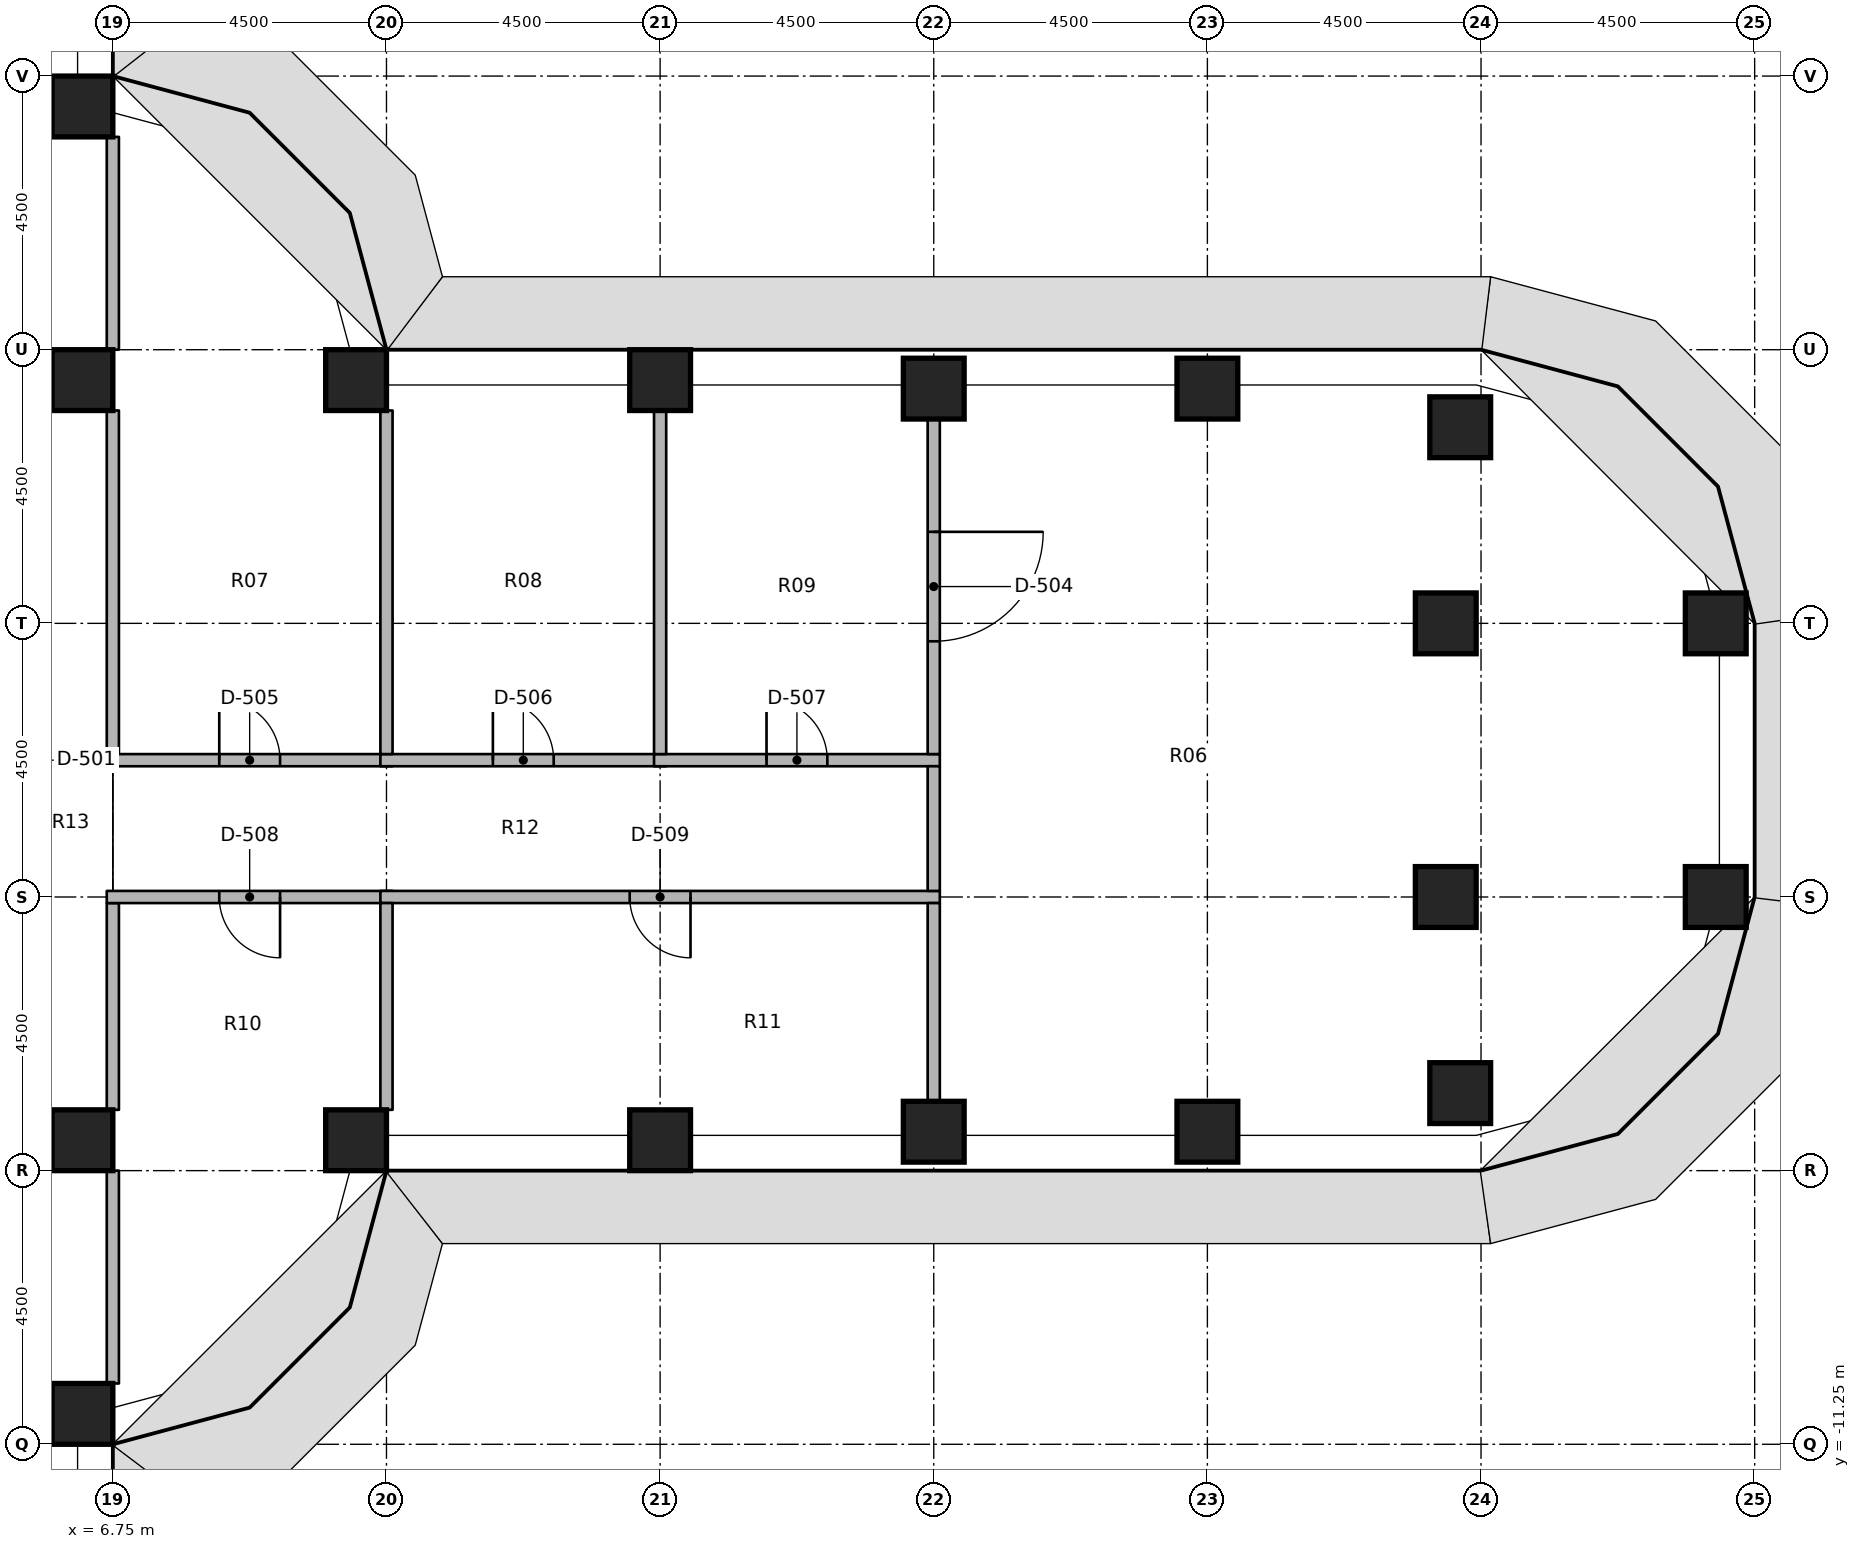
"""IFC4 building model, lengths in metres.
Left out: names, types, materials, properties, quantities, classifications, styles, units other than length and angle.
Written with IfcOpenShell. Run it as: python <this file> out.ifc"""

import sys

from ifc_helpers import new_model, si_unit, direction, frame, frame_2d, origin, origin_2d, place, context, subcontext, project, spatial, rectangle, extrude, element, fill, save


model = new_model("IFC4")
c1 = context("Model", 3, precision=1e-05, world=origin(), true_north=direction((0.0, 1.0)))
c2 = subcontext(c1, "Body", "Model", "MODEL_VIEW")
j1 = project(units=[si_unit("LENGTHUNIT", "METRE"), si_unit("PLANEANGLEUNIT", "RADIAN")], contexts=[c1])
p1 = place(None, origin())
s1 = spatial("IfcSite", under=j1, at=p1, CompositionType="ELEMENT")
p2 = place(p1, origin())
s2 = spatial("IfcBuilding", under=s1, at=p2, CompositionType="ELEMENT")
p3 = place(p2, frame((0.0, 0.0, 69.0)))
s3 = spatial("IfcBuildingStorey", under=s2, at=p3, CompositionType="ELEMENT", Elevation=69.0)
for number, where, z_axis, x_axis in (
    (1, (6.25, -10.75, 0.0), (0.0, 0.0, 1.0), (1.0, 0.0, 0.0)),
    (2, (6.25, -6.25, 0.0), (0.0, 0.0, 1.0), (1.0, 0.0, 0.0)),
    (3, (6.25, 6.25, 0.0), (0.0, 0.0, 1.0), (1.0, 0.0, 0.0)),
    (4, (6.25, 10.75, 0.0), (0.0, 0.0, 1.0), (1.0, 0.0, 0.0)),
    (5, (10.75, -6.25, 0.0), (0.0, 0.0, 1.0), (1.0, 0.0, 0.0)),
    (6, (10.75, 6.25, 0.0), (0.0, 0.0, 1.0), (1.0, 0.0, 0.0)),
    (7, (15.75, -6.25, 0.0), (0.0, 0.0, 1.0), (1.0, 0.0, 0.0)),
    (8, (15.75, 6.25, 0.0), (0.0, 0.0, 1.0), (1.0, 0.0, 0.0)),
    (9, (20.25, -6.11, 0.0), (0.0, 0.0, 1.0), (1.0, 0.0, 0.0)),
    (10, (20.25, 6.11, 0.0), (0.0, 0.0, 1.0), (1.0, 0.0, 0.0)),
    (11, (24.75, -6.11, 0.0), (0.0, 0.0, 1.0), (1.0, 0.0, 0.0)),
    (12, (24.75, 6.11, 0.0), (0.0, 0.0, 1.0), (1.0, 0.0, 0.0)),
    (13, (28.908, -5.475, 0.0), (0.0, 0.0, 1.0), (1.0, 0.0, 0.0)),
    (14, (28.67, -2.25, 0.0), (0.0, 0.0, 1.0), (1.0, 0.0, 0.0)),
    (15, (28.67, 2.25, 0.0), (0.0, 0.0, 1.0), (1.0, 0.0, 0.0)),
    (16, (28.908, 5.475, 0.0), (0.0, 0.0, 1.0), (1.0, 0.0, 0.0)),
    (17, (33.11, -2.25, 0.0), (0.0, 0.0, 1.0), (1.0, 0.0, 0.0)),
    (18, (33.11, 2.25, 0.0), (0.0, 0.0, 1.0), (1.0, 0.0, 0.0)),
):
    element("IfcColumn", number, at=place(p3, frame(where, z_axis=z_axis, x_axis=x_axis)), inside=s3, PredefinedType="COLUMN", context=c2, shape_type="SweptSolid", body=[
        extrude(rectangle(XDim=1.0, YDim=1.0, at=origin_2d()), origin(), (0.0, 0.0, 1.0), 4.05),
    ])
p4 = place(p3, frame((6.75, 0.1, 0.0), z_axis=(0.0, 0.0, 1.0), x_axis=(0.0, 1.0, 0.0)))
e19 = element("IfcWall", 19, at=p4, inside=s3, PredefinedType="PARTITIONING", context=c2, shape_type="SweptSolid", body=[
    extrude(rectangle(XDim=5.65, YDim=0.2, at=frame_2d((2.825, 0.0))), origin(), (0.0, 0.0, 1.0), 3.131),
])
for number, where, z_axis, x_axis in (
    (20, (6.75, 6.75, 0.0), (0.0, 0.0, 1.0), (0.0, 1.0, 0.0)),
    (21, (6.75, -10.25, 0.0), (0.0, 0.0, 1.0), (0.0, 1.0, 0.0)),
):
    element("IfcWall", number, at=place(p3, frame(where, z_axis=z_axis, x_axis=x_axis)), inside=s3, PredefinedType="PARTITIONING", context=c2, shape_type="SweptSolid", body=[
        extrude(rectangle(XDim=3.5, YDim=0.2, at=frame_2d((1.75, 0.0))), origin(), (0.0, 0.0, 1.0), 3.131),
    ])
p5 = place(p3, frame((6.75, -5.75, 0.0), z_axis=(0.0, 0.0, 1.0), x_axis=(0.0, 1.0, 0.0)))
e22 = element("IfcWall", 22, at=p5, inside=s3, PredefinedType="PARTITIONING", context=c2, shape_type="SweptSolid", body=[
    extrude(rectangle(XDim=3.4, YDim=0.2, at=frame_2d((1.7, 0.0))), origin(), (0.0, 0.0, 1.0), 3.131),
])
p6 = place(p3, frame((6.65, 0.0, 0.0), z_axis=(0.0, 0.0, 1.0), x_axis=(1.0, 0.0, 0.0)))
e23 = element("IfcWall", 23, at=p6, inside=s3, PredefinedType="PARTITIONING", context=c2, shape_type="SweptSolid", body=[
    extrude(rectangle(XDim=4.7, YDim=0.2, at=frame_2d((2.35, 0.0))), origin(), (0.0, 0.0, 1.0), 3.131),
])
p7 = place(p6, frame((1.85, 0.0, 0.0)))
e24 = element("IfcOpeningElement", 24, at=p7, cuts=e23, PredefinedType="OPENING", context=c2, shape_type="SweptSolid", body=[
    extrude(rectangle(XDim=1.0, YDim=2.1, at=frame_2d((0.5, 1.05))), frame((0.0, 0.11, 0.0), z_axis=(0.0, -1.0, 0.0), x_axis=(1.0, 0.0, 0.0)), (0.0, 0.0, 1.0), 0.22),
])
p8 = place(p3, frame((11.35, -2.25, 0.0), z_axis=(0.0, 0.0, 1.0), x_axis=(-1.0, 0.0, 0.0)))
e25 = element("IfcWall", 25, at=p8, inside=s3, PredefinedType="PARTITIONING", context=c2, shape_type="SweptSolid", body=[
    extrude(rectangle(XDim=4.7, YDim=0.2, at=frame_2d((2.35, 0.0))), origin(), (0.0, 0.0, 1.0), 3.131),
])
p9 = place(p8, frame((1.85, 0.0, 0.0)))
e26 = element("IfcOpeningElement", 26, at=p9, cuts=e25, PredefinedType="OPENING", context=c2, shape_type="SweptSolid", body=[
    extrude(rectangle(XDim=1.0, YDim=2.1, at=frame_2d((0.5, 1.05))), frame((0.0, 0.11, 0.0), z_axis=(0.0, -1.0, 0.0), x_axis=(1.0, 0.0, 0.0)), (0.0, 0.0, 1.0), 0.22),
])
p10 = place(p3, frame((11.15, 0.0, 0.0), z_axis=(0.0, 0.0, 1.0), x_axis=(1.0, 0.0, 0.0)))
e27 = element("IfcWall", 27, at=p10, inside=s3, PredefinedType="PARTITIONING", context=c2, shape_type="SweptSolid", body=[
    extrude(rectangle(XDim=4.7, YDim=0.2, at=frame_2d((2.35, 0.0))), origin(), (0.0, 0.0, 1.0), 3.131),
])
p11 = place(p10, frame((1.85, 0.0, 0.0)))
e28 = element("IfcOpeningElement", 28, at=p11, cuts=e27, PredefinedType="OPENING", context=c2, shape_type="SweptSolid", body=[
    extrude(rectangle(XDim=1.0, YDim=2.1, at=frame_2d((0.5, 1.05))), frame((0.0, 0.11, 0.0), z_axis=(0.0, -1.0, 0.0), x_axis=(1.0, 0.0, 0.0)), (0.0, 0.0, 1.0), 0.22),
])
p12 = place(p3, frame((15.65, 0.0, 0.0), z_axis=(0.0, 0.0, 1.0), x_axis=(1.0, 0.0, 0.0)))
e29 = element("IfcWall", 29, at=p12, inside=s3, PredefinedType="PARTITIONING", context=c2, shape_type="SweptSolid", body=[
    extrude(rectangle(XDim=4.7, YDim=0.2, at=frame_2d((2.35, 0.0))), origin(), (0.0, 0.0, 1.0), 3.131),
])
p13 = place(p12, frame((1.85, 0.0, 0.0)))
e30 = element("IfcOpeningElement", 30, at=p13, cuts=e29, PredefinedType="OPENING", context=c2, shape_type="SweptSolid", body=[
    extrude(rectangle(XDim=1.0, YDim=2.1, at=frame_2d((0.5, 1.05))), frame((0.0, 0.11, 0.0), z_axis=(0.0, -1.0, 0.0), x_axis=(1.0, 0.0, 0.0)), (0.0, 0.0, 1.0), 0.22),
])
p14 = place(p3, frame((20.35, -2.25, 0.0), z_axis=(0.0, 0.0, 1.0), x_axis=(-1.0, 0.0, 0.0)))
e31 = element("IfcWall", 31, at=p14, inside=s3, PredefinedType="PARTITIONING", context=c2, shape_type="SweptSolid", body=[
    extrude(rectangle(XDim=9.2, YDim=0.2, at=frame_2d((4.6, 0.0))), origin(), (0.0, 0.0, 1.0), 3.131),
])
p15 = place(p14, frame((4.1, 0.0, 0.0)))
e32 = element("IfcOpeningElement", 32, at=p15, cuts=e31, PredefinedType="OPENING", context=c2, shape_type="SweptSolid", body=[
    extrude(rectangle(XDim=1.0, YDim=2.1, at=frame_2d((0.5, 1.05))), frame((0.0, 0.11, 0.0), z_axis=(0.0, -1.0, 0.0), x_axis=(1.0, 0.0, 0.0)), (0.0, 0.0, 1.0), 0.22),
])
p16 = place(p3, frame((20.25, -2.15, 0.0), z_axis=(0.0, 0.0, 1.0), x_axis=(0.0, 1.0, 0.0)))
e33 = element("IfcWall", 33, at=p16, inside=s3, PredefinedType="PARTITIONING", context=c2, shape_type="SweptSolid", body=[
    extrude(rectangle(XDim=2.05, YDim=0.2, at=frame_2d((1.025, 0.0))), origin(), (0.0, 0.0, 1.0), 3.131),
])
p17 = place(p3, frame((11.25, 0.1, 0.0), z_axis=(0.0, 0.0, 1.0), x_axis=(0.0, 1.0, 0.0)))
e34 = element("IfcWall", 34, at=p17, inside=s3, PredefinedType="PARTITIONING", context=c2, shape_type="SweptSolid", body=[
    extrude(rectangle(XDim=5.65, YDim=0.2, at=frame_2d((2.825, 0.0))), origin(), (0.0, 0.0, 1.0), 3.131),
])
p18 = place(p3, frame((11.25, -5.75, 0.0), z_axis=(0.0, 0.0, 1.0), x_axis=(0.0, 1.0, 0.0)))
e35 = element("IfcWall", 35, at=p18, inside=s3, PredefinedType="PARTITIONING", context=c2, shape_type="SweptSolid", body=[
    extrude(rectangle(XDim=3.4, YDim=0.2, at=frame_2d((1.7, 0.0))), origin(), (0.0, 0.0, 1.0), 3.131),
])
p19 = place(p3, frame((15.75, 0.1, 0.0), z_axis=(0.0, 0.0, 1.0), x_axis=(0.0, 1.0, 0.0)))
e36 = element("IfcWall", 36, at=p19, inside=s3, PredefinedType="PARTITIONING", context=c2, shape_type="SweptSolid", body=[
    extrude(rectangle(XDim=5.65, YDim=0.2, at=frame_2d((2.825, 0.0))), origin(), (0.0, 0.0, 1.0), 3.131),
])
p20 = place(p3, frame((20.25, 5.61, 0.0), z_axis=(0.0, 0.0, 1.0), x_axis=(0.0, -1.0, 0.0)))
e37 = element("IfcWall", 37, at=p20, inside=s3, PredefinedType="PARTITIONING", context=c2, shape_type="SweptSolid", body=[
    extrude(rectangle(XDim=5.51, YDim=0.2, at=frame_2d((2.755, 0.0))), origin(), (0.0, 0.0, 1.0), 3.131),
])
p21 = place(p20, frame((1.855, 0.0, 0.0)))
e38 = element("IfcOpeningElement", 38, at=p21, cuts=e37, PredefinedType="OPENING", context=c2, shape_type="SweptSolid", body=[
    extrude(rectangle(XDim=1.8, YDim=2.1, at=frame_2d((0.9, 1.05))), frame((0.0, 0.11, 0.0), z_axis=(0.0, -1.0, 0.0), x_axis=(1.0, 0.0, 0.0)), (0.0, 0.0, 1.0), 0.22),
])
p22 = place(p3, frame((20.25, -5.61, 0.0), z_axis=(0.0, 0.0, 1.0), x_axis=(0.0, 1.0, 0.0)))
e39 = element("IfcWall", 39, at=p22, inside=s3, PredefinedType="PARTITIONING", context=c2, shape_type="SweptSolid", body=[
    extrude(rectangle(XDim=3.26, YDim=0.2, at=frame_2d((1.63, 0.0))), origin(), (0.0, 0.0, 1.0), 3.131),
])
p23 = place(p21, origin())
e40 = element("IfcDoor", 40, at=p23, inside=s3, OperationType="DOUBLE_DOOR_SINGLE_SWING", PredefinedType="DOOR", context=c2, shape_type="SweptSolid", body=[
    extrude(rectangle(XDim=1.8, YDim=2.1, at=frame_2d((0.9, 1.05))), frame((0.0, 0.025, 0.0), z_axis=(0.0, -1.0, 0.0), x_axis=(1.0, 0.0, 0.0)), (0.0, 0.0, 1.0), 0.05),
])
fill(e38, e40)
p24 = place(p7, origin())
e41 = element("IfcDoor", 41, at=p24, inside=s3, OperationType="SINGLE_SWING_RIGHT", PredefinedType="DOOR", context=c2, shape_type="SweptSolid", body=[
    extrude(rectangle(XDim=1.0, YDim=2.1, at=frame_2d((0.5, 1.05))), frame((0.0, 0.025, 0.0), z_axis=(0.0, -1.0, 0.0), x_axis=(1.0, 0.0, 0.0)), (0.0, 0.0, 1.0), 0.05),
])
fill(e24, e41)
p25 = place(p11, origin())
e42 = element("IfcDoor", 42, at=p25, inside=s3, OperationType="SINGLE_SWING_RIGHT", PredefinedType="DOOR", context=c2, shape_type="SweptSolid", body=[
    extrude(rectangle(XDim=1.0, YDim=2.1, at=frame_2d((0.5, 1.05))), frame((0.0, 0.025, 0.0), z_axis=(0.0, -1.0, 0.0), x_axis=(1.0, 0.0, 0.0)), (0.0, 0.0, 1.0), 0.05),
])
fill(e28, e42)
p26 = place(p13, origin())
e43 = element("IfcDoor", 43, at=p26, inside=s3, OperationType="SINGLE_SWING_LEFT", PredefinedType="DOOR", context=c2, shape_type="SweptSolid", body=[
    extrude(rectangle(XDim=1.0, YDim=2.1, at=frame_2d((0.5, 1.05))), frame((0.0, 0.025, 0.0), z_axis=(0.0, -1.0, 0.0), x_axis=(1.0, 0.0, 0.0)), (0.0, 0.0, 1.0), 0.05),
])
fill(e30, e43)
p27 = place(p9, origin())
e44 = element("IfcDoor", 44, at=p27, inside=s3, OperationType="SINGLE_SWING_RIGHT", PredefinedType="DOOR", context=c2, shape_type="SweptSolid", body=[
    extrude(rectangle(XDim=1.0, YDim=2.1, at=frame_2d((0.5, 1.05))), frame((0.0, 0.025, 0.0), z_axis=(0.0, -1.0, 0.0), x_axis=(1.0, 0.0, 0.0)), (0.0, 0.0, 1.0), 0.05),
])
fill(e26, e44)
p28 = place(p15, origin())
e45 = element("IfcDoor", 45, at=p28, inside=s3, OperationType="SINGLE_SWING_RIGHT", PredefinedType="DOOR", context=c2, shape_type="SweptSolid", body=[
    extrude(rectangle(XDim=1.0, YDim=2.1, at=frame_2d((0.5, 1.05))), frame((0.0, 0.025, 0.0), z_axis=(0.0, -1.0, 0.0), x_axis=(1.0, 0.0, 0.0)), (0.0, 0.0, 1.0), 0.05),
])
fill(e32, e45)
save(model, sys.argv[1])
